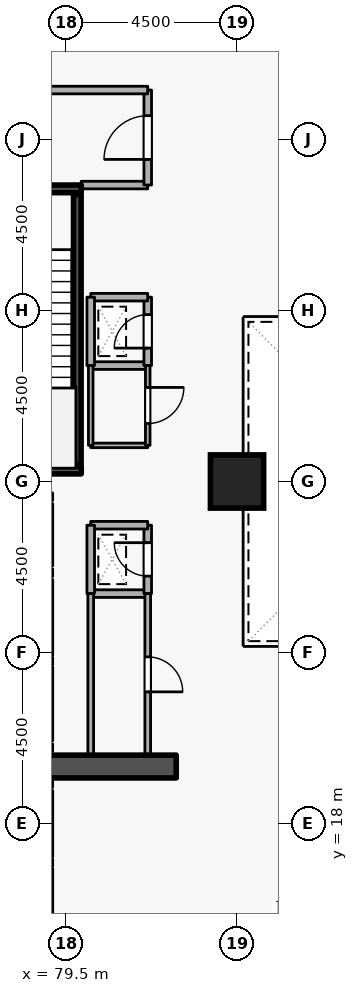
"""IFC4 building model, lengths in metres.
Left out: names, types, materials, properties, quantities, classifications, styles, units other than length and angle.
Written with IfcOpenShell. Run it as: python <this file> out.ifc"""

import sys

from ifc_helpers import new_model, si_unit, direction, frame, frame_2d, origin, origin_2d, place, context, subcontext, project, spatial, rectangle, extrude, element, fill, save


model = new_model("IFC4")
c1 = context("Model", 3, precision=1e-05, world=origin(), true_north=direction((0.0, 1.0)))
c2 = subcontext(c1, "Body", "Model", "MODEL_VIEW")
j1 = project(units=[si_unit("LENGTHUNIT", "METRE"), si_unit("PLANEANGLEUNIT", "RADIAN")], contexts=[c1])
p1 = place(None, origin())
s1 = spatial("IfcSite", under=j1, at=p1, CompositionType="ELEMENT")
p2 = place(p1, origin())
s2 = spatial("IfcBuilding", under=s1, at=p2, CompositionType="ELEMENT")
p3 = place(p2, frame((0.0, 0.0, 14.1)))
s3 = spatial("IfcBuildingStorey", under=s2, at=p3, CompositionType="ELEMENT", Elevation=14.1)
p4 = place(p3, frame((76.7, 19.5, 0.0), z_axis=(0.0, 0.0, 1.0), x_axis=(1.0, 0.0, 0.0)))
e1 = element("IfcWall", 1, at=p4, inside=s3, PredefinedType="SHEAR", context=c2, shape_type="SweptSolid", body=[
    extrude(rectangle(XDim=5.7, YDim=0.6, at=frame_2d((2.85, 0.0))), origin(), (0.0, 0.0, 1.0), 4.5),
])
p5 = place(p3, frame((84.0, 27.0, 0.0), z_axis=(0.0, 0.0, 1.0), x_axis=(1.0, 0.0, 0.0)))
e2 = element("IfcColumn", 2, at=p5, inside=s3, PredefinedType="COLUMN", context=c2, shape_type="SweptSolid", body=[
    extrude(rectangle(XDim=1.4, YDim=1.4, at=origin_2d()), origin(), (0.0, 0.0, 1.0), 4.5),
])
p6 = place(p3, frame((79.05, 24.78, 0.0), z_axis=(0.0, 0.0, 1.0), x_axis=(0.0, 1.0, 0.0)))
e3 = element("IfcWall", 3, at=p6, inside=s3, PredefinedType="STANDARD", context=c2, shape_type="SweptSolid", body=[
    extrude(rectangle(XDim=1.64, YDim=0.2, at=frame_2d((0.82, 0.0))), origin(), (0.0, 0.0, 1.0), 4.16),
])
p7 = place(p6, frame((0.31, 0.0, 0.0)))
e4 = element("IfcOpeningElement", 4, at=p7, cuts=e3, PredefinedType="OPENING", context=c2, shape_type="SweptSolid", body=[
    extrude(rectangle(XDim=1.02, YDim=2.06, at=frame_2d((0.51, 1.03))), frame((0.0, 0.11, 0.0), z_axis=(0.0, -1.0, 0.0), x_axis=(1.0, 0.0, 0.0)), (0.0, 0.0, 1.0), 0.22),
])
p8 = place(p3, frame((79.05, 22.43, 0.0), z_axis=(0.0, 0.0, 1.0), x_axis=(0.0, 1.0, 0.0)))
e5 = element("IfcWall", 5, at=p8, inside=s3, PredefinedType="STANDARD", context=c2, shape_type="SweptSolid", body=[
    extrude(rectangle(XDim=1.99, YDim=0.2, at=frame_2d((0.995, 0.0))), origin(), (0.0, 0.0, 1.0), 4.16),
])
p9 = place(p3, frame((79.05, 20.18, 0.0), z_axis=(0.0, 0.0, 1.0), x_axis=(0.0, 1.0, 0.0)))
e6 = element("IfcWall", 6, at=p9, inside=s3, PredefinedType="STANDARD", context=c2, shape_type="SweptSolid", body=[
    extrude(rectangle(XDim=1.94, YDim=0.2, at=frame_2d((0.97, 0.0))), origin(), (0.0, 0.0, 1.0), 4.16),
])
p10 = place(p3, frame((79.05, 17.13, 0.0), z_axis=(0.0, 0.0, 1.0), x_axis=(0.0, 1.0, 0.0)))
e7 = element("IfcWall", 7, at=p10, inside=s3, PredefinedType="STANDARD", context=c2, shape_type="SweptSolid", body=[
    extrude(rectangle(XDim=1.74, YDim=0.2, at=frame_2d((0.87, 0.0))), origin(), (0.0, 0.0, 1.0), 4.16),
])
p11 = place(p3, frame((79.05, 15.03, 0.0), z_axis=(0.0, 0.0, 1.0), x_axis=(0.0, 1.0, 0.0)))
e8 = element("IfcWall", 8, at=p11, inside=s3, PredefinedType="STANDARD", context=c2, shape_type="SweptSolid", body=[
    extrude(rectangle(XDim=1.79, YDim=0.2, at=frame_2d((0.895, 0.0))), origin(), (0.0, 0.0, 1.0), 4.16),
])
p12 = place(p3, frame((76.55, 34.7, 0.0), z_axis=(0.0, 0.0, 1.0), x_axis=(1.0, 0.0, 0.0)))
e9 = element("IfcWall", 9, at=p12, inside=s3, PredefinedType="SHEAR", context=c2, shape_type="SweptSolid", body=[
    extrude(rectangle(XDim=3.35, YDim=0.2, at=frame_2d((1.675, 0.0))), origin(), (0.0, 0.0, 1.0), 4.5),
])
p13 = place(p12, frame((1.125, 0.0, 0.0)))
e10 = element("IfcOpeningElement", 10, at=p13, cuts=e9, PredefinedType="OPENING", context=c2, shape_type="SweptSolid", body=[
    extrude(rectangle(XDim=1.1, YDim=2.1, at=frame_2d((0.55, 1.05))), frame((0.0, 0.11, 0.0), z_axis=(0.0, -1.0, 0.0), x_axis=(1.0, 0.0, 0.0)), (0.0, 0.0, 1.0), 0.22),
])
p14 = place(p3, frame((79.9, 27.3, 0.0), z_axis=(0.0, 0.0, 1.0), x_axis=(-1.0, 0.0, 0.0)))
e11 = element("IfcWall", 11, at=p14, inside=s3, PredefinedType="SHEAR", context=c2, shape_type="SweptSolid", body=[
    extrude(rectangle(XDim=3.35, YDim=0.2, at=frame_2d((1.675, 0.0))), origin(), (0.0, 0.0, 1.0), 4.5),
])
p15 = place(p3, frame((79.797, 27.45, 0.0), z_axis=(0.0, 0.0, 1.0), x_axis=(0.0, 1.0, 0.0)))
e12 = element("IfcWall", 12, at=p15, inside=s3, PredefinedType="SHEAR", context=c2, shape_type="SweptSolid", body=[
    extrude(rectangle(XDim=7.1, YDim=0.2, at=frame_2d((3.55, 0.0))), origin(), (0.0, 0.0, 1.0), 4.5),
])
p16 = place(p3, frame((79.9, 34.8, 0.0), z_axis=(0.0, 0.0, 1.0), x_axis=(1.0, 0.0, 0.0)))
e13 = element("IfcWall", 13, at=p16, inside=s3, PredefinedType="STANDARD", context=c2, shape_type="SweptSolid", body=[
    extrude(rectangle(XDim=1.75, YDim=0.2, at=frame_2d((0.875, 0.0))), origin(), (0.0, 0.0, 1.0), 3.365),
])
p17 = place(p3, frame((81.65, 34.8, 0.0), z_axis=(0.0, 0.0, 1.0), x_axis=(0.0, 1.0, 0.0)))
e14 = element("IfcWall", 14, at=p17, inside=s3, PredefinedType="STANDARD", context=c2, shape_type="SweptSolid", body=[
    extrude(rectangle(XDim=2.5, YDim=0.2, at=frame_2d((1.25, 0.0))), origin(), (0.0, 0.0, 1.0), 4.16),
])
p18 = place(p17, frame((0.675, 0.0, 0.0)))
e15 = element("IfcOpeningElement", 15, at=p18, cuts=e14, PredefinedType="OPENING", context=c2, shape_type="SweptSolid", body=[
    extrude(rectangle(XDim=1.15, YDim=2.1, at=frame_2d((0.575, 1.05))), frame((0.0, 0.11, 0.0), z_axis=(0.0, -1.0, 0.0), x_axis=(1.0, 0.0, 0.0)), (0.0, 0.0, 1.0), 0.22),
])
p19 = place(p3, frame((81.65, 37.3, 0.0), z_axis=(0.0, 0.0, 1.0), x_axis=(-1.0, 0.0, 0.0)))
e16 = element("IfcWall", 16, at=p19, inside=s3, PredefinedType="STANDARD", context=c2, shape_type="SweptSolid", body=[
    extrude(rectangle(XDim=5.15, YDim=0.2, at=frame_2d((2.575, 0.0))), origin(), (0.0, 0.0, 1.0), 4.16),
])
p20 = place(p3, frame((80.15, 24.05, 0.0), z_axis=(0.0, 0.0, 1.0), x_axis=(1.0, 0.0, 0.0)))
e17 = element("IfcWall", 17, at=p20, inside=s3, PredefinedType="STANDARD", context=c2, shape_type="SweptSolid", body=[
    extrude(rectangle(XDim=1.5, YDim=0.2, at=frame_2d((0.75, 0.0))), origin(), (0.0, 0.0, 1.0), 4.16),
])
p21 = place(p3, frame((81.65, 24.05, 0.0), z_axis=(0.0, 0.0, 1.0), x_axis=(0.0, 1.0, 0.0)))
e18 = element("IfcWall", 18, at=p21, inside=s3, PredefinedType="STANDARD", context=c2, shape_type="SweptSolid", body=[
    extrude(rectangle(XDim=1.8, YDim=0.2, at=frame_2d((0.9, 0.0))), origin(), (0.0, 0.0, 1.0), 4.16),
])
p22 = place(p21, frame((0.46, 0.0, 0.0)))
e19 = element("IfcOpeningElement", 19, at=p22, cuts=e18, PredefinedType="OPENING", context=c2, shape_type="SweptSolid", body=[
    extrude(rectangle(XDim=0.88, YDim=2.04, at=frame_2d((0.44, 1.02))), frame((0.0, 0.11, 0.0), z_axis=(0.0, -1.0, 0.0), x_axis=(1.0, 0.0, 0.0)), (0.0, 0.0, 1.0), 0.22),
])
p23 = place(p3, frame((81.65, 25.85, 0.0), z_axis=(0.0, 0.0, 1.0), x_axis=(-1.0, 0.0, 0.0)))
e20 = element("IfcWall", 20, at=p23, inside=s3, PredefinedType="STANDARD", context=c2, shape_type="SweptSolid", body=[
    extrude(rectangle(XDim=1.5, YDim=0.2, at=frame_2d((0.75, 0.0))), origin(), (0.0, 0.0, 1.0), 4.16),
])
p24 = place(p3, frame((80.15, 25.85, 0.0), z_axis=(0.0, 0.0, 1.0), x_axis=(0.0, -1.0, 0.0)))
e21 = element("IfcWall", 21, at=p24, inside=s3, PredefinedType="STANDARD", context=c2, shape_type="SweptSolid", body=[
    extrude(rectangle(XDim=1.8, YDim=0.2, at=frame_2d((0.9, 0.0))), origin(), (0.0, 0.0, 1.0), 4.16),
])
p25 = place(p3, frame((80.15, 30.05, 0.0), z_axis=(0.0, 0.0, 1.0), x_axis=(1.0, 0.0, 0.0)))
e22 = element("IfcWall", 22, at=p25, inside=s3, PredefinedType="STANDARD", context=c2, shape_type="SweptSolid", body=[
    extrude(rectangle(XDim=1.5, YDim=0.2, at=frame_2d((0.75, 0.0))), origin(), (0.0, 0.0, 1.0), 4.16),
])
p26 = place(p3, frame((81.65, 30.05, 0.0), z_axis=(0.0, 0.0, 1.0), x_axis=(0.0, 1.0, 0.0)))
e23 = element("IfcWall", 23, at=p26, inside=s3, PredefinedType="STANDARD", context=c2, shape_type="SweptSolid", body=[
    extrude(rectangle(XDim=1.8, YDim=0.2, at=frame_2d((0.9, 0.0))), origin(), (0.0, 0.0, 1.0), 4.16),
])
p27 = place(p26, frame((0.46, 0.0, 0.0)))
e24 = element("IfcOpeningElement", 24, at=p27, cuts=e23, PredefinedType="OPENING", context=c2, shape_type="SweptSolid", body=[
    extrude(rectangle(XDim=0.88, YDim=2.04, at=frame_2d((0.44, 1.02))), frame((0.0, 0.11, 0.0), z_axis=(0.0, -1.0, 0.0), x_axis=(1.0, 0.0, 0.0)), (0.0, 0.0, 1.0), 0.22),
])
p28 = place(p3, frame((81.65, 31.85, 0.0), z_axis=(0.0, 0.0, 1.0), x_axis=(-1.0, 0.0, 0.0)))
e25 = element("IfcWall", 25, at=p28, inside=s3, PredefinedType="STANDARD", context=c2, shape_type="SweptSolid", body=[
    extrude(rectangle(XDim=1.5, YDim=0.2, at=frame_2d((0.75, 0.0))), origin(), (0.0, 0.0, 1.0), 4.16),
])
p29 = place(p3, frame((80.15, 31.85, 0.0), z_axis=(0.0, 0.0, 1.0), x_axis=(0.0, -1.0, 0.0)))
e26 = element("IfcWall", 26, at=p29, inside=s3, PredefinedType="STANDARD", context=c2, shape_type="SweptSolid", body=[
    extrude(rectangle(XDim=1.8, YDim=0.2, at=frame_2d((0.9, 0.0))), origin(), (0.0, 0.0, 1.0), 4.16),
])
p30 = place(p3, frame((80.15, 19.8, 0.0), z_axis=(0.0, 0.0, 1.0), x_axis=(0.0, 1.0, 0.0)))
e27 = element("IfcWall", 27, at=p30, inside=s3, PredefinedType="PARTITIONING", context=c2, shape_type="SweptSolid", body=[
    extrude(rectangle(XDim=4.25, YDim=0.15, at=frame_2d((2.125, 0.0))), origin(), (0.0, 0.0, 1.0), 4.16),
])
p31 = place(p3, frame((81.65, 24.05, 0.0), z_axis=(0.0, 0.0, 1.0), x_axis=(0.0, -1.0, 0.0)))
e28 = element("IfcWall", 28, at=p31, inside=s3, PredefinedType="PARTITIONING", context=c2, shape_type="SweptSolid", body=[
    extrude(rectangle(XDim=4.25, YDim=0.15, at=frame_2d((2.125, 0.0))), origin(), (0.0, 0.0, 1.0), 4.16),
])
p32 = place(p31, frame((1.665, 0.0, 0.0)))
e29 = element("IfcOpeningElement", 29, at=p32, cuts=e28, PredefinedType="OPENING", context=c2, shape_type="SweptSolid", body=[
    extrude(rectangle(XDim=0.92, YDim=2.08, at=frame_2d((0.46, 1.04))), frame((0.0, 0.085, 0.0), z_axis=(0.0, -1.0, 0.0), x_axis=(1.0, 0.0, 0.0)), (0.0, 0.0, 1.0), 0.17),
])
p33 = place(p3, frame((81.65, 27.95, 0.0), z_axis=(0.0, 0.0, 1.0), x_axis=(-1.0, 0.0, 0.0)))
e30 = element("IfcWall", 30, at=p33, inside=s3, PredefinedType="PARTITIONING", context=c2, shape_type="SweptSolid", body=[
    extrude(rectangle(XDim=1.5, YDim=0.12, at=frame_2d((0.75, 0.0))), origin(), (0.0, 0.0, 1.0), 4.16),
])
p34 = place(p3, frame((80.15, 27.95, 0.0), z_axis=(0.0, 0.0, 1.0), x_axis=(0.0, 1.0, 0.0)))
e31 = element("IfcWall", 31, at=p34, inside=s3, PredefinedType="PARTITIONING", context=c2, shape_type="SweptSolid", body=[
    extrude(rectangle(XDim=2.1, YDim=0.12, at=frame_2d((1.05, 0.0))), origin(), (0.0, 0.0, 1.0), 4.16),
])
p35 = place(p3, frame((81.65, 30.05, 0.0), z_axis=(0.0, 0.0, 1.0), x_axis=(0.0, -1.0, 0.0)))
e32 = element("IfcWall", 32, at=p35, inside=s3, PredefinedType="PARTITIONING", context=c2, shape_type="SweptSolid", body=[
    extrude(rectangle(XDim=2.1, YDim=0.12, at=frame_2d((1.05, 0.0))), origin(), (0.0, 0.0, 1.0), 4.16),
])
p36 = place(p35, frame((0.575, 0.0, 0.0)))
e33 = element("IfcOpeningElement", 33, at=p36, cuts=e32, PredefinedType="OPENING", context=c2, shape_type="SweptSolid", body=[
    extrude(rectangle(XDim=0.95, YDim=2.1, at=frame_2d((0.475, 1.05))), frame((0.0, 0.07, 0.0), z_axis=(0.0, -1.0, 0.0), x_axis=(1.0, 0.0, 0.0)), (0.0, 0.0, 1.0), 0.14),
])
p37 = place(p18, origin())
e34 = element("IfcDoor", 34, at=p37, inside=s3, OperationType="SINGLE_SWING_LEFT", PredefinedType="DOOR", context=c2, shape_type="SweptSolid", body=[
    extrude(rectangle(XDim=1.15, YDim=2.1, at=frame_2d((0.575, 1.05))), frame((0.0, 0.025, 0.0), z_axis=(0.0, -1.0, 0.0), x_axis=(1.0, 0.0, 0.0)), (0.0, 0.0, 1.0), 0.05),
])
fill(e15, e34)
p38 = place(p22, origin())
e35 = element("IfcDoor", 35, at=p38, inside=s3, OperationType="SINGLE_SWING_RIGHT", PredefinedType="DOOR", context=c2, shape_type="SweptSolid", body=[
    extrude(rectangle(XDim=0.88, YDim=2.04, at=frame_2d((0.44, 1.02))), frame((0.0, 0.025, 0.0), z_axis=(0.0, -1.0, 0.0), x_axis=(1.0, 0.0, 0.0)), (0.0, 0.0, 1.0), 0.05),
])
fill(e19, e35)
p39 = place(p27, origin())
e36 = element("IfcDoor", 36, at=p39, inside=s3, OperationType="SINGLE_SWING_LEFT", PredefinedType="DOOR", context=c2, shape_type="SweptSolid", body=[
    extrude(rectangle(XDim=0.88, YDim=2.04, at=frame_2d((0.44, 1.02))), frame((0.0, 0.025, 0.0), z_axis=(0.0, -1.0, 0.0), x_axis=(1.0, 0.0, 0.0)), (0.0, 0.0, 1.0), 0.05),
])
fill(e24, e36)
p40 = place(p32, origin())
e37 = element("IfcDoor", 37, at=p40, inside=s3, OperationType="SINGLE_SWING_RIGHT", PredefinedType="DOOR", context=c2, shape_type="SweptSolid", body=[
    extrude(rectangle(XDim=0.92, YDim=2.08, at=frame_2d((0.46, 1.04))), frame((0.0, 0.025, 0.0), z_axis=(0.0, -1.0, 0.0), x_axis=(1.0, 0.0, 0.0)), (0.0, 0.0, 1.0), 0.05),
])
fill(e29, e37)
p41 = place(p36, origin())
e38 = element("IfcDoor", 38, at=p41, inside=s3, OperationType="SINGLE_SWING_LEFT", PredefinedType="DOOR", context=c2, shape_type="SweptSolid", body=[
    extrude(rectangle(XDim=0.95, YDim=2.1, at=frame_2d((0.475, 1.05))), frame((0.0, 0.025, 0.0), z_axis=(0.0, -1.0, 0.0), x_axis=(1.0, 0.0, 0.0)), (0.0, 0.0, 1.0), 0.05),
])
fill(e33, e38)
save(model, sys.argv[1])
